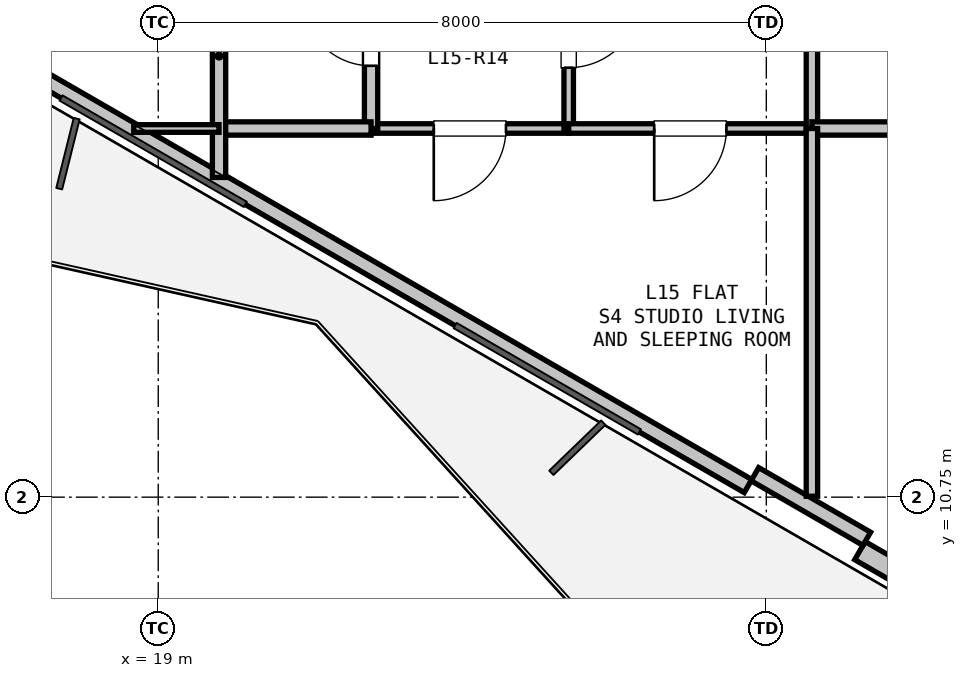
"""IFC4 building model, lengths in metres.
Left out: names, types, materials, properties, quantities, classifications, styles, units other than length and angle.
Written with IfcOpenShell. Run it as: python <this file> out.ifc"""

import sys

from ifc_helpers import new_model, si_unit, direction, frame, frame_2d, origin, place, context, subcontext, project, spatial, rectangle, extrude, element, fill, save


model = new_model("IFC4")
c1 = context("Model", 3, precision=1e-05, world=origin(), true_north=direction((0.0, 1.0)))
c2 = subcontext(c1, "Body", "Model", "MODEL_VIEW")
j1 = project(units=[si_unit("LENGTHUNIT", "METRE"), si_unit("PLANEANGLEUNIT", "RADIAN")], contexts=[c1])
p1 = place(None, origin())
s1 = spatial("IfcSite", under=j1, at=p1, CompositionType="ELEMENT")
p2 = place(p1, origin())
s2 = spatial("IfcBuilding", under=s1, at=p2, CompositionType="ELEMENT")
p3 = place(p2, frame((0.0, 0.0, 55.5)))
s3 = spatial("IfcBuildingStorey", under=s2, at=p3, CompositionType="ELEMENT", Elevation=55.5)
p4 = place(p3, frame((39.207, 3.71, 0.0), z_axis=(0.0, 0.0, 1.0), x_axis=(-0.86603192154, 0.499988710747, 0.0)))
e1 = element("IfcWall", 1, at=p4, inside=s3, PredefinedType="SOLIDWALL", context=c2, shape_type="SweptSolid", body=[
    extrude(rectangle(XDim=12.673, YDim=0.275, at=frame_2d((6.336, 0.0))), origin(), (0.0, 0.0, 1.0), 2.66),
])
p5 = place(p4, frame((8.136, 0.0, 0.0)))
e2 = element("IfcOpeningElement", 2, at=p5, cuts=e1, PredefinedType="OPENING", context=c2, shape_type="SweptSolid", body=[
    extrude(rectangle(XDim=1.0, YDim=2.1, at=frame_2d((0.5, 1.05))), frame((0.0, 0.147, 0.0), z_axis=(0.0, -1.0, 0.0), x_axis=(1.0, 0.0, 0.0)), (0.0, 0.0, 1.0), 0.295),
])
p6 = place(p4, frame((2.971, 0.0, 0.9)))
e3 = element("IfcOpeningElement", 3, at=p6, cuts=e1, PredefinedType="OPENING", context=c2, shape_type="SweptSolid", body=[
    extrude(rectangle(XDim=1.2, YDim=1.4, at=frame_2d((0.6, 0.7))), frame((0.0, 0.147, 0.0), z_axis=(0.0, -1.0, 0.0), x_axis=(1.0, 0.0, 0.0)), (0.0, 0.0, 1.0), 0.295),
])
p7 = place(p3, frame((26.76, 10.896, 0.0), z_axis=(0.0, 0.0, 1.0), x_axis=(-0.866027351828, 0.499996625875, 0.0)))
e4 = element("IfcWall", 4, at=p7, inside=s3, PredefinedType="PARAPET", context=c2, shape_type="SweptSolid", body=[
    extrude(rectangle(XDim=11.973, YDim=0.2, at=frame_2d((5.987, 0.0))), origin(), (0.0, 0.0, 1.0), 0.2),
])
p8 = place(p3, frame((28.322, 10.202, 0.0), z_axis=(0.0, 0.0, 1.0), x_axis=(-0.86605165483, 0.499954529098, 0.0)))
e5 = element("IfcWall", 5, at=p8, inside=s3, PredefinedType="PARAPET", context=c2, shape_type="SweptSolid", body=[
    extrude(rectangle(XDim=1.7, YDim=0.2, at=frame_2d((0.85, 0.0))), origin(), (0.0, 0.0, 1.0), 2.66),
])
p9 = place(p3, frame((24.4, 15.6, 0.0), z_axis=(0.0, 0.0, 1.0), x_axis=(-1.0, 0.0, 0.0)))
e6 = element("IfcWall", 6, at=p9, inside=s3, PredefinedType="PARTITIONING", context=c2, shape_type="SweptSolid", body=[
    extrude(rectangle(XDim=2.6, YDim=0.125, at=frame_2d((1.3, 0.0))), origin(), (0.0, 0.0, 1.0), 3.04),
])
p10 = place(p9, frame((0.825, 0.0, 0.0)))
e7 = element("IfcOpeningElement", 7, at=p10, cuts=e6, PredefinedType="OPENING", context=c2, shape_type="SweptSolid", body=[
    extrude(rectangle(XDim=0.95, YDim=2.1, at=frame_2d((0.475, 1.05))), frame((0.0, 0.073, 0.0), z_axis=(0.0, -1.0, 0.0), x_axis=(1.0, 0.0, 0.0)), (0.0, 0.0, 1.0), 0.145),
])
p11 = place(p3, frame((21.8, 15.6, 0.0), z_axis=(0.0, 0.0, 1.0), x_axis=(0.0, 1.0, 0.0)))
e8 = element("IfcWall", 8, at=p11, inside=s3, PredefinedType="PLUMBINGWALL", context=c2, shape_type="SweptSolid", body=[
    extrude(rectangle(XDim=2.55, YDim=0.175, at=frame_2d((1.275, 0.0))), origin(), (0.0, 0.0, 1.0), 3.04),
])
p12 = place(p11, frame((0.825, 0.0, 0.0)))
e9 = element("IfcOpeningElement", 9, at=p12, cuts=e8, PredefinedType="OPENING", context=c2, shape_type="SweptSolid", body=[
    extrude(rectangle(XDim=0.9, YDim=2.1, at=frame_2d((0.45, 1.05))), frame((0.0, 0.097, 0.0), z_axis=(0.0, -1.0, 0.0), x_axis=(1.0, 0.0, 0.0)), (0.0, 0.0, 1.0), 0.195),
])
p13 = place(p3, frame((24.4, 18.15, 0.0), z_axis=(0.0, 0.0, 1.0), x_axis=(0.0, -1.0, 0.0)))
e10 = element("IfcWall", 10, at=p13, inside=s3, PredefinedType="PARTITIONING", context=c2, shape_type="SweptSolid", body=[
    extrude(rectangle(XDim=2.55, YDim=0.125, at=frame_2d((1.275, 0.0))), origin(), (0.0, 0.0, 1.0), 2.337),
])
p14 = place(p13, frame((0.8, 0.0, 0.0)))
e11 = element("IfcOpeningElement", 11, at=p14, cuts=e10, PredefinedType="OPENING", context=c2, shape_type="SweptSolid", body=[
    extrude(rectangle(XDim=0.95, YDim=2.1, at=frame_2d((0.475, 1.05))), frame((0.0, 0.073, 0.0), z_axis=(0.0, -1.0, 0.0), x_axis=(1.0, 0.0, 0.0)), (0.0, 0.0, 1.0), 0.145),
])
p15 = place(p3, frame((21.8, 15.6, 0.0), z_axis=(0.0, 0.0, 1.0), x_axis=(-1.0, 0.0, 0.0)))
e12 = element("IfcWall", 12, at=p15, inside=s3, PredefinedType="PLUMBINGWALL", context=c2, shape_type="SweptSolid", body=[
    extrude(rectangle(XDim=2.0, YDim=0.175, at=frame_2d((1.0, 0.0))), origin(), (0.0, 0.0, 1.0), 2.365),
])
p16 = place(p3, frame((19.8, 14.956, 0.0), z_axis=(0.0, 0.0, 1.0), x_axis=(0.0, 1.0, 0.0)))
e13 = element("IfcWall", 13, at=p16, inside=s3, PredefinedType="PLUMBINGWALL", context=c2, shape_type="SweptSolid", body=[
    extrude(rectangle(XDim=3.194, YDim=0.175, at=frame_2d((1.597, 0.0))), origin(), (0.0, 0.0, 1.0), 2.365),
])
p17 = place(p3, frame((27.6, 15.6, 0.0), z_axis=(0.0, 0.0, 1.0), x_axis=(-1.0, 0.0, 0.0)))
e14 = element("IfcWall", 14, at=p17, inside=s3, PredefinedType="PARTITIONING", context=c2, shape_type="SweptSolid", body=[
    extrude(rectangle(XDim=3.2, YDim=0.125, at=frame_2d((1.6, 0.0))), origin(), (0.0, 0.0, 1.0), 2.337),
])
p18 = place(p17, frame((1.125, 0.0, 0.0)))
e15 = element("IfcOpeningElement", 15, at=p18, cuts=e14, PredefinedType="OPENING", context=c2, shape_type="SweptSolid", body=[
    extrude(rectangle(XDim=0.95, YDim=2.1, at=frame_2d((0.475, 1.05))), frame((0.0, 0.073, 0.0), z_axis=(0.0, -1.0, 0.0), x_axis=(1.0, 0.0, 0.0)), (0.0, 0.0, 1.0), 0.145),
])
p19 = place(p3, frame((27.6, 18.15, 0.0), z_axis=(0.0, 0.0, 1.0), x_axis=(0.0, -1.0, 0.0)))
e16 = element("IfcWall", 16, at=p19, inside=s3, PredefinedType="PARTITIONING", context=c2, shape_type="SweptSolid", body=[
    extrude(rectangle(XDim=2.55, YDim=0.15, at=frame_2d((1.275, 0.0))), origin(), (0.0, 0.0, 1.0), 3.04),
])
p20 = place(p3, frame((29.6, 15.6, 0.0), z_axis=(0.0, 0.0, 1.0), x_axis=(-1.0, 0.0, 0.0)))
e17 = element("IfcWall", 17, at=p20, inside=s3, PredefinedType="PLUMBINGWALL", context=c2, shape_type="SweptSolid", body=[
    extrude(rectangle(XDim=2.0, YDim=0.175, at=frame_2d((1.0, 0.0))), origin(), (0.0, 0.0, 1.0), 3.04),
])
p21 = place(p3, frame((18.678, 15.6, 0.0), z_axis=(0.0, 0.0, 1.0), x_axis=(1.0, 0.0, 0.0)))
e18 = element("IfcWall", 18, at=p21, inside=s3, PredefinedType="PARTITIONING", context=c2, shape_type="SweptSolid", body=[
    extrude(rectangle(XDim=1.122, YDim=0.1, at=frame_2d((0.561, 0.0))), origin(), (0.0, 0.0, 1.0), 2.365),
])
p22 = place(p3, frame((27.6, 15.6, 0.0), z_axis=(0.0, 0.0, 1.0), x_axis=(0.0, -1.0, 0.0)))
e19 = element("IfcWall", 19, at=p22, inside=s3, PredefinedType="PARTITIONING", context=c2, shape_type="SweptSolid", body=[
    extrude(rectangle(XDim=4.838, YDim=0.15, at=frame_2d((2.419, 0.0))), origin(), (0.0, 0.0, 1.0), 2.337),
])
p23 = place(p12, origin())
e20 = element("IfcDoor", 20, at=p23, inside=s3, OperationType="SINGLE_SWING_RIGHT", PredefinedType="DOOR", context=c2, shape_type="SweptSolid", body=[
    extrude(rectangle(XDim=0.9, YDim=2.1, at=frame_2d((0.45, 1.05))), frame((0.0, 0.025, 0.0), z_axis=(0.0, -1.0, 0.0), x_axis=(1.0, 0.0, 0.0)), (0.0, 0.0, 1.0), 0.05),
])
fill(e9, e20)
p24 = place(p14, origin())
e21 = element("IfcDoor", 21, at=p24, inside=s3, OperationType="SINGLE_SWING_LEFT", PredefinedType="DOOR", context=c2, shape_type="SweptSolid", body=[
    extrude(rectangle(XDim=0.95, YDim=2.1, at=frame_2d((0.475, 1.05))), frame((0.0, 0.025, 0.0), z_axis=(0.0, -1.0, 0.0), x_axis=(1.0, 0.0, 0.0)), (0.0, 0.0, 1.0), 0.05),
])
fill(e11, e21)
p25 = place(p10, origin())
e22 = element("IfcDoor", 22, at=p25, inside=s3, OperationType="SINGLE_SWING_RIGHT", PredefinedType="DOOR", context=c2, shape_type="SweptSolid", body=[
    extrude(rectangle(XDim=0.95, YDim=2.1, at=frame_2d((0.475, 1.05))), frame((0.0, 0.025, 0.0), z_axis=(0.0, -1.0, 0.0), x_axis=(1.0, 0.0, 0.0)), (0.0, 0.0, 1.0), 0.05),
])
fill(e7, e22)
p26 = place(p18, origin())
e23 = element("IfcDoor", 23, at=p26, inside=s3, OperationType="SINGLE_SWING_RIGHT", PredefinedType="DOOR", context=c2, shape_type="SweptSolid", body=[
    extrude(rectangle(XDim=0.95, YDim=2.1, at=frame_2d((0.475, 1.05))), frame((0.0, 0.025, 0.0), z_axis=(0.0, -1.0, 0.0), x_axis=(1.0, 0.0, 0.0)), (0.0, 0.0, 1.0), 0.05),
])
fill(e15, e23)
save(model, sys.argv[1])
